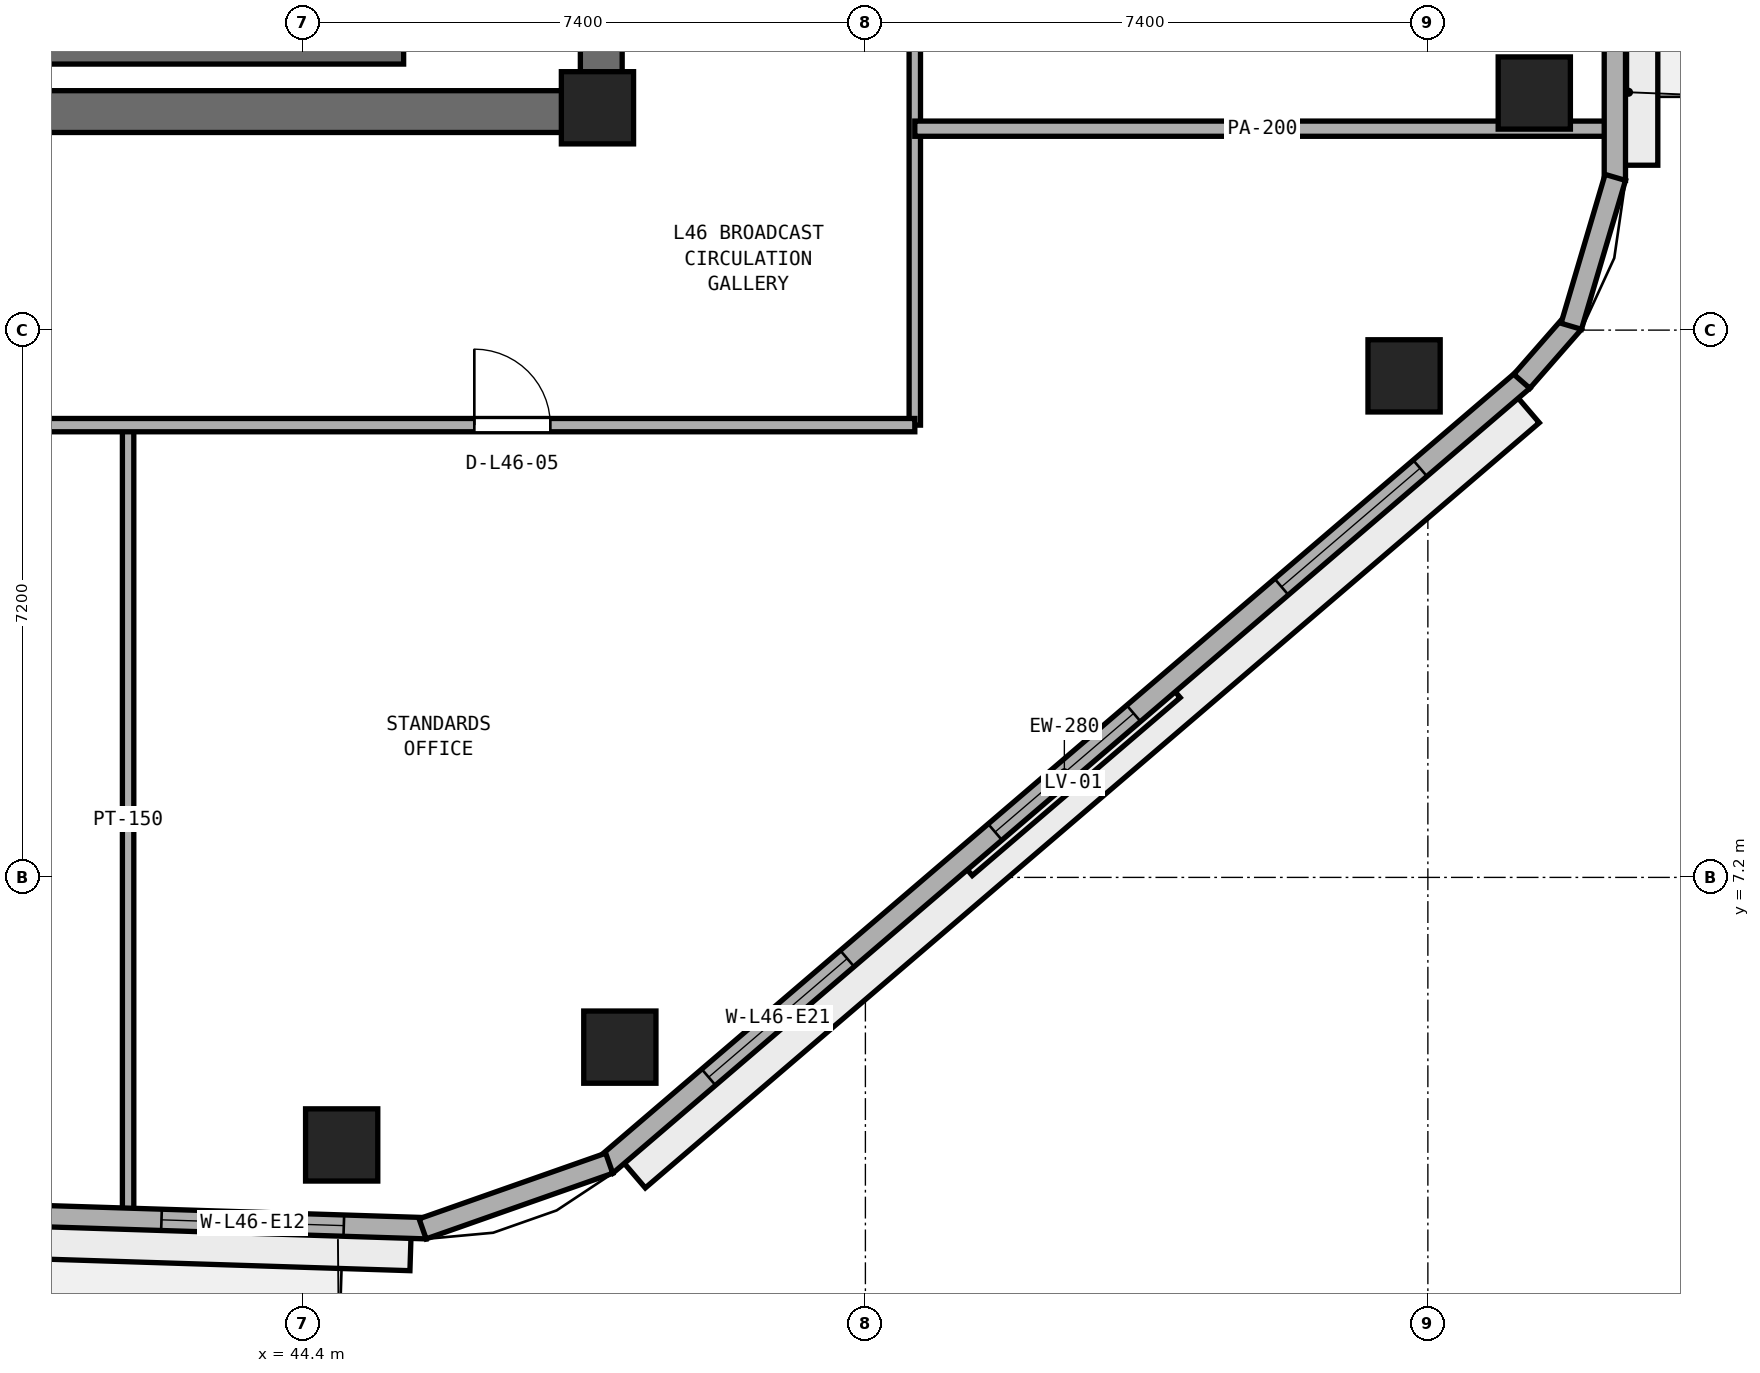
"""IFC4 building model, lengths in metres.
Left out: names, types, materials, properties, quantities, classifications, styles, units other than length and angle.
Written with IfcOpenShell. Run it as: python <this file> out.ifc"""

import sys

from ifc_helpers import new_model, si_unit, direction, frame, frame_2d, origin, origin_2d, place, context, subcontext, project, spatial, rectangle, extrude, element, fill, save


model = new_model("IFC4")
c1 = context("Model", 3, precision=1e-05, world=origin(), true_north=direction((0.0, 1.0)))
c2 = subcontext(c1, "Body", "Model", "MODEL_VIEW")
j1 = project(units=[si_unit("LENGTHUNIT", "METRE"), si_unit("PLANEANGLEUNIT", "RADIAN")], contexts=[c1])
p1 = place(None, origin())
s1 = spatial("IfcSite", under=j1, at=p1, CompositionType="ELEMENT")
p2 = place(p1, origin())
s2 = spatial("IfcBuilding", under=s1, at=p2, CompositionType="ELEMENT")
p3 = place(p2, frame((0.0, 0.0, 182.0)))
s3 = spatial("IfcBuildingStorey", under=s2, at=p3, CompositionType="ELEMENT", Elevation=182.0)
p4 = place(p3, frame((25.4, 17.275, 0.0), z_axis=(0.0, 0.0, 1.0), x_axis=(1.0, 0.0, 0.0)))
e1 = element("IfcWall", 1, at=p4, inside=s3, PredefinedType="SHEAR", context=c2, shape_type="SweptSolid", body=[
    extrude(rectangle(XDim=23.2, YDim=0.55, at=frame_2d((11.6, 0.0))), origin(), (0.0, 0.0, 1.0), 3.54),
])
p5 = place(p3, frame((48.325, 17.55, 0.0), z_axis=(0.0, 0.0, 1.0), x_axis=(0.0, 1.0, 0.0)))
e2 = element("IfcWall", 2, at=p5, inside=s3, PredefinedType="SHEAR", context=c2, shape_type="SweptSolid", body=[
    extrude(rectangle(XDim=15.3, YDim=0.55, at=frame_2d((7.65, 0.0))), origin(), (0.0, 0.0, 1.0), 3.54),
])
p6 = place(p5, frame((5.75, 0.0, 0.0)))
e3 = element("IfcOpeningElement", 3, at=p6, cuts=e2, PredefinedType="OPENING", context=c2, shape_type="SweptSolid", body=[
    extrude(rectangle(XDim=1.5, YDim=2.15, at=frame_2d((0.75, 1.075))), frame((0.0, 0.285, 0.0), z_axis=(0.0, -1.0, 0.0), x_axis=(1.0, 0.0, 0.0)), (0.0, 0.0, 1.0), 0.57),
])
p7 = place(p3, frame((48.275, 17.325, 0.0), z_axis=(0.0, 0.0, 1.0), x_axis=(1.0, 0.0, 0.0)))
e4 = element("IfcColumn", 4, at=p7, inside=s3, PredefinedType="PILASTER", context=c2, shape_type="SweptSolid", body=[
    extrude(rectangle(XDim=0.95, YDim=0.95, at=origin_2d()), origin(), (0.0, 0.0, 1.0), 3.8),
])
for number, where, z_axis, x_axis in (
    (5, (44.91, 3.68, 0.0), (0.0, 0.0, 1.0), (1.0, 0.0, 0.0)),
    (6, (48.57, 4.967, 0.0), (0.0, 0.0, 1.0), (1.0, 0.0, 0.0)),
    (7, (58.887, 13.798, 0.0), (0.0, 0.0, 1.0), (1.0, 0.0, 0.0)),
    (8, (60.6, 17.519, 0.0), (0.0, 0.0, 1.0), (1.0, 0.0, 0.0)),
):
    element("IfcColumn", number, at=place(p3, frame(where, z_axis=z_axis, x_axis=x_axis)), inside=s3, PredefinedType="COLUMN", context=c2, shape_type="SweptSolid", body=[
        extrude(rectangle(XDim=0.95, YDim=0.95, at=origin_2d()), origin(), (0.0, 0.0, 1.0), 3.8),
    ])
p8 = place(p3, frame((38.425, 18.025, 0.0), z_axis=(0.0, 0.0, 1.0), x_axis=(1.0, 0.0, 0.0)))
e9 = element("IfcWall", 9, at=p8, inside=s3, PredefinedType="SHEAR", context=c2, shape_type="SweptSolid", body=[
    extrude(rectangle(XDim=7.3, YDim=0.25, at=frame_2d((3.65, 0.0))), origin(), (0.0, 0.0, 1.0), 3.54),
])
p9 = place(p3, frame((52.45, 13.15, 0.0), z_axis=(0.0, 0.0, 1.0), x_axis=(0.0, 1.0, 0.0)))
e10 = element("IfcWall", 10, at=p9, inside=s3, PredefinedType="PARTITIONING", context=c2, shape_type="SweptSolid", body=[
    extrude(rectangle(XDim=10.7, YDim=0.15, at=frame_2d((5.35, 0.0))), origin(), (0.0, 0.0, 1.0), 3.54),
])
p10 = place(p9, frame((5.575, 0.0, 0.0)))
e11 = element("IfcOpeningElement", 11, at=p10, cuts=e10, PredefinedType="OPENING", context=c2, shape_type="SweptSolid", body=[
    extrude(rectangle(XDim=0.9, YDim=2.1, at=frame_2d((0.45, 1.05))), frame((0.0, 0.085, 0.0), z_axis=(0.0, -1.0, 0.0), x_axis=(1.0, 0.0, 0.0)), (0.0, 0.0, 1.0), 0.17),
])
p11 = place(p3, frame((42.1, 2.774, 0.0), z_axis=(0.0, 0.0, 1.0), x_axis=(0.0, 1.0, 0.0)))
e12 = element("IfcWall", 12, at=p11, inside=s3, PredefinedType="PARTITIONING", context=c2, shape_type="SweptSolid", body=[
    extrude(rectangle(XDim=10.376, YDim=0.15, at=frame_2d((5.188, 0.0))), origin(), (0.0, 0.0, 1.0), 3.54),
])
p12 = place(p3, frame((21.55, 13.15, 0.0), z_axis=(0.0, 0.0, 1.0), x_axis=(1.0, 0.0, 0.0)))
e13 = element("IfcWall", 13, at=p12, inside=s3, PredefinedType="PARTITIONING", context=c2, shape_type="SweptSolid", body=[
    extrude(rectangle(XDim=30.9, YDim=0.175, at=frame_2d((15.45, 0.0))), origin(), (0.0, 0.0, 1.0), 3.54),
])
p13 = place(p12, frame((4.145, 0.0, 0.0)))
e14 = element("IfcOpeningElement", 14, at=p13, cuts=e13, PredefinedType="OPENING", context=c2, shape_type="SweptSolid", body=[
    extrude(rectangle(XDim=1.0, YDim=2.12, at=frame_2d((0.5, 1.06))), frame((0.0, 0.097, 0.0), z_axis=(0.0, -1.0, 0.0), x_axis=(1.0, 0.0, 0.0)), (0.0, 0.0, 1.0), 0.195),
])
p14 = place(p12, frame((14.3, 0.0, 0.0)))
e15 = element("IfcOpeningElement", 15, at=p14, cuts=e13, PredefinedType="OPENING", context=c2, shape_type="SweptSolid", body=[
    extrude(rectangle(XDim=1.0, YDim=2.12, at=frame_2d((0.5, 1.06))), frame((0.0, 0.097, 0.0), z_axis=(0.0, -1.0, 0.0), x_axis=(1.0, 0.0, 0.0)), (0.0, 0.0, 1.0), 0.195),
])
p15 = place(p12, frame((25.105, 0.0, 0.0)))
e16 = element("IfcOpeningElement", 16, at=p15, cuts=e13, PredefinedType="OPENING", context=c2, shape_type="SweptSolid", body=[
    extrude(rectangle(XDim=1.0, YDim=2.12, at=frame_2d((0.5, 1.06))), frame((0.0, 0.097, 0.0), z_axis=(0.0, -1.0, 0.0), x_axis=(1.0, 0.0, 0.0)), (0.0, 0.0, 1.0), 0.195),
])
p16 = place(p3, frame((52.45, 17.05, 0.0), z_axis=(0.0, 0.0, 1.0), x_axis=(1.0, 0.0, 0.0)))
e17 = element("IfcWall", 17, at=p16, inside=s3, PredefinedType="PARTITIONING", context=c2, shape_type="SweptSolid", body=[
    extrude(rectangle(XDim=9.145, YDim=0.2, at=frame_2d((4.573, 0.0))), origin(), (0.0, 0.0, 1.0), 3.54),
])
p17 = place(p3, frame((29.625, 3.104, 0.0), z_axis=(0.0, 0.0, 1.0), x_axis=(0.99949718661, -0.031707632487, 0.0)))
e18 = element("IfcWall", 18, at=p17, inside=s3, PredefinedType="STANDARD", context=c2, shape_type="SweptSolid", body=[
    extrude(rectangle(XDim=16.408, YDim=0.28, at=frame_2d((8.204, 0.0))), origin(), (0.0, 0.0, 1.0), 3.54),
])
p18 = place(p17, frame((7.654, 0.0, 0.0)))
e19 = element("IfcOpeningElement", 19, at=p18, cuts=e18, PredefinedType="OPENING", context=c2, shape_type="SweptSolid", body=[
    extrude(rectangle(XDim=1.1, YDim=2.2, at=frame_2d((0.55, 1.1))), frame((0.0, 0.15, 0.0), z_axis=(0.0, -1.0, 0.0), x_axis=(1.0, 0.0, 0.0)), (0.0, 0.0, 1.0), 0.3),
])
p19 = place(p17, frame((1.868, 0.0, 0.9)))
e20 = element("IfcOpeningElement", 20, at=p19, cuts=e18, PredefinedType="OPENING", context=c2, shape_type="SweptSolid", body=[
    extrude(rectangle(XDim=2.4, YDim=1.75, at=frame_2d((1.2, 0.875))), frame((0.0, 0.15, 0.0), z_axis=(0.0, -1.0, 0.0), x_axis=(1.0, 0.0, 0.0)), (0.0, 0.0, 1.0), 0.3),
])
p20 = place(p17, frame((12.92, 0.0, 0.9)))
e21 = element("IfcOpeningElement", 21, at=p20, cuts=e18, PredefinedType="OPENING", context=c2, shape_type="SweptSolid", body=[
    extrude(rectangle(XDim=2.4, YDim=1.75, at=frame_2d((1.2, 0.875))), frame((0.0, 0.15, 0.0), z_axis=(0.0, -1.0, 0.0), x_axis=(1.0, 0.0, 0.0)), (0.0, 0.0, 1.0), 0.3),
])
p21 = place(p3, frame((48.385, 3.414, 0.0), z_axis=(0.0, 0.0, 1.0), x_axis=(0.759700260779, 0.650273414628, 0.0)))
e22 = element("IfcWall", 22, at=p21, inside=s3, PredefinedType="STANDARD", context=c2, shape_type="SweptSolid", body=[
    extrude(rectangle(XDim=15.881, YDim=0.28, at=frame_2d((7.94, 0.0))), origin(), (0.0, 0.0, 1.0), 3.54),
])
p22 = place(p21, frame((1.78, 0.0, 0.9)))
e23 = element("IfcOpeningElement", 23, at=p22, cuts=e22, PredefinedType="OPENING", context=c2, shape_type="SweptSolid", body=[
    extrude(rectangle(XDim=2.4, YDim=1.75, at=frame_2d((1.2, 0.875))), frame((0.0, 0.15, 0.0), z_axis=(0.0, -1.0, 0.0), x_axis=(1.0, 0.0, 0.0)), (0.0, 0.0, 1.0), 0.3),
])
p23 = place(p21, frame((6.74, 0.0, 0.9)))
e24 = element("IfcOpeningElement", 24, at=p23, cuts=e22, PredefinedType="OPENING", context=c2, shape_type="SweptSolid", body=[
    extrude(rectangle(XDim=2.4, YDim=1.75, at=frame_2d((1.2, 0.875))), frame((0.0, 0.15, 0.0), z_axis=(0.0, -1.0, 0.0), x_axis=(1.0, 0.0, 0.0)), (0.0, 0.0, 1.0), 0.3),
])
p24 = place(p21, frame((11.701, 0.0, 0.9)))
e25 = element("IfcOpeningElement", 25, at=p24, cuts=e22, PredefinedType="OPENING", context=c2, shape_type="SweptSolid", body=[
    extrude(rectangle(XDim=2.4, YDim=1.75, at=frame_2d((1.2, 0.875))), frame((0.0, 0.15, 0.0), z_axis=(0.0, -1.0, 0.0), x_axis=(1.0, 0.0, 0.0)), (0.0, 0.0, 1.0), 0.3),
])
p25 = place(p3, frame((61.66, 16.369, 0.0), z_axis=(0.0, 0.0, 1.0), x_axis=(0.0, 1.0, 0.0)))
e26 = element("IfcWall", 26, at=p25, inside=s3, PredefinedType="STANDARD", context=c2, shape_type="SweptSolid", body=[
    extrude(rectangle(XDim=18.902, YDim=0.28, at=frame_2d((9.451, 0.0))), origin(), (0.0, 0.0, 1.0), 3.54),
])
p26 = place(p25, frame((8.601, 0.0, 0.0)))
e27 = element("IfcOpeningElement", 27, at=p26, cuts=e26, PredefinedType="OPENING", context=c2, shape_type="SweptSolid", body=[
    extrude(rectangle(XDim=1.1, YDim=2.2, at=frame_2d((0.55, 1.1))), frame((0.0, 0.15, 0.0), z_axis=(0.0, -1.0, 0.0), x_axis=(1.0, 0.0, 0.0)), (0.0, 0.0, 1.0), 0.3),
])
p27 = place(p25, frame((2.034, 0.0, 0.9)))
e28 = element("IfcOpeningElement", 28, at=p27, cuts=e26, PredefinedType="OPENING", context=c2, shape_type="SweptSolid", body=[
    extrude(rectangle(XDim=2.4, YDim=1.75, at=frame_2d((1.2, 0.875))), frame((0.0, 0.15, 0.0), z_axis=(0.0, -1.0, 0.0), x_axis=(1.0, 0.0, 0.0)), (0.0, 0.0, 1.0), 0.3),
])
p28 = place(p25, frame((14.219, 0.0, 0.9)))
e29 = element("IfcOpeningElement", 29, at=p28, cuts=e26, PredefinedType="OPENING", context=c2, shape_type="SweptSolid", body=[
    extrude(rectangle(XDim=2.4, YDim=1.75, at=frame_2d((1.2, 0.875))), frame((0.0, 0.15, 0.0), z_axis=(0.0, -1.0, 0.0), x_axis=(1.0, 0.0, 0.0)), (0.0, 0.0, 1.0), 0.3),
])
p29 = place(p3, frame((45.975, 2.576, 0.0), z_axis=(0.0, 0.0, 1.0), x_axis=(0.943377643365, 0.331720698781, 0.0)))
e30 = element("IfcWall", 30, at=p29, inside=s3, PredefinedType="STANDARD", context=c2, shape_type="SweptSolid", body=[
    extrude(rectangle(XDim=2.603, YDim=0.28, at=frame_2d((1.301, 0.0))), origin(), (0.0, 0.0, 1.0), 3.54),
])
p30 = place(p3, frame((60.436, 13.727, 0.0), z_axis=(0.0, 0.0, 1.0), x_axis=(0.658571618609, 0.752518055041, 0.0)))
e31 = element("IfcWall", 31, at=p30, inside=s3, PredefinedType="STANDARD", context=c2, shape_type="SweptSolid", body=[
    extrude(rectangle(XDim=1.032, YDim=0.28, at=frame_2d((0.516, 0.0))), origin(), (0.0, 0.0, 1.0), 3.54),
])
p31 = place(p3, frame((61.086, 14.45, 0.0), z_axis=(0.0, 0.0, 1.0), x_axis=(0.283660953453, 0.958924639107, 0.0)))
e32 = element("IfcWall", 32, at=p31, inside=s3, PredefinedType="STANDARD", context=c2, shape_type="SweptSolid", body=[
    extrude(rectangle(XDim=2.042, YDim=0.28, at=frame_2d((1.021, 0.0))), origin(), (0.0, 0.0, 1.0), 3.54),
])
p32 = place(p15, origin())
e33 = element("IfcDoor", 33, at=p32, inside=s3, OperationType="SINGLE_SWING_LEFT", PredefinedType="DOOR", context=c2, shape_type="SweptSolid", body=[
    extrude(rectangle(XDim=1.0, YDim=2.12, at=frame_2d((0.5, 1.06))), frame((0.0, 0.025, 0.0), z_axis=(0.0, -1.0, 0.0), x_axis=(1.0, 0.0, 0.0)), (0.0, 0.0, 1.0), 0.05),
])
fill(e16, e33)
p33 = place(p20, origin())
e34 = element("IfcWindow", 34, at=p33, inside=s3, PartitioningType="SINGLE_PANEL", PredefinedType="WINDOW", context=c2, shape_type="SweptSolid", body=[
    extrude(rectangle(XDim=2.4, YDim=1.75, at=frame_2d((1.2, 0.875))), frame((0.0, 0.03, 0.0), z_axis=(0.0, -1.0, 0.0), x_axis=(1.0, 0.0, 0.0)), (0.0, 0.0, 1.0), 0.06),
])
fill(e21, e34)
p34 = place(p22, origin())
e35 = element("IfcWindow", 35, at=p34, inside=s3, PartitioningType="SINGLE_PANEL", PredefinedType="WINDOW", context=c2, shape_type="SweptSolid", body=[
    extrude(rectangle(XDim=2.4, YDim=1.75, at=frame_2d((1.2, 0.875))), frame((0.0, 0.03, 0.0), z_axis=(0.0, -1.0, 0.0), x_axis=(1.0, 0.0, 0.0)), (0.0, 0.0, 1.0), 0.06),
])
fill(e23, e35)
p35 = place(p23, origin())
e36 = element("IfcWindow", 36, at=p35, inside=s3, PartitioningType="SINGLE_PANEL", PredefinedType="WINDOW", context=c2, shape_type="SweptSolid", body=[
    extrude(rectangle(XDim=2.4, YDim=1.75, at=frame_2d((1.2, 0.875))), frame((0.0, 0.03, 0.0), z_axis=(0.0, -1.0, 0.0), x_axis=(1.0, 0.0, 0.0)), (0.0, 0.0, 1.0), 0.06),
])
fill(e24, e36)
p36 = place(p24, origin())
e37 = element("IfcWindow", 37, at=p36, inside=s3, PartitioningType="SINGLE_PANEL", PredefinedType="WINDOW", context=c2, shape_type="SweptSolid", body=[
    extrude(rectangle(XDim=2.4, YDim=1.75, at=frame_2d((1.2, 0.875))), frame((0.0, 0.03, 0.0), z_axis=(0.0, -1.0, 0.0), x_axis=(1.0, 0.0, 0.0)), (0.0, 0.0, 1.0), 0.06),
])
fill(e25, e37)
save(model, sys.argv[1])
